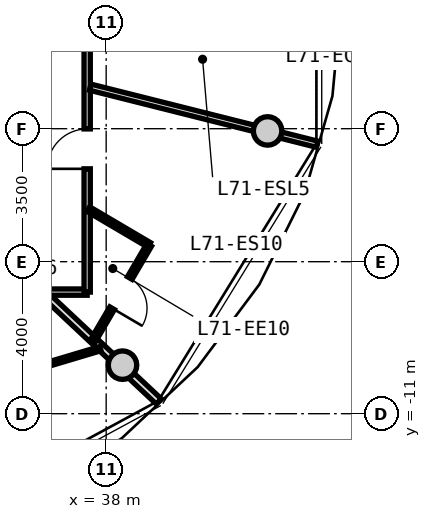
"""IFC4 building model, lengths in metres.
Left out: names, types, materials, properties, quantities, classifications, styles, units other than length and angle.
Written with IfcOpenShell. Run it as: python <this file> out.ifc"""

import sys

from ifc_helpers import new_model, si_unit, direction, frame, frame_2d, origin, origin_2d, place, context, subcontext, project, spatial, rectangle, circle, extrude, source, transform, mapped, element, fill, save


model = new_model("IFC4")
c1 = context("Model", 3, precision=1e-05, world=origin(), true_north=direction((0.0, 1.0)))
c2 = subcontext(c1, "Body", "Model", "MODEL_VIEW")
j1 = project(units=[si_unit("LENGTHUNIT", "METRE"), si_unit("PLANEANGLEUNIT", "RADIAN")], contexts=[c1])
p1 = place(None, origin())
s1 = spatial("IfcSite", under=j1, at=p1, CompositionType="ELEMENT")
p2 = place(p1, origin())
s2 = spatial("IfcBuilding", under=s1, at=p2, CompositionType="ELEMENT")
p3 = place(p2, frame((0.0, 0.0, 229.15)))
s3 = spatial("IfcBuildingStorey", under=s2, at=p3, CompositionType="ELEMENT", Elevation=229.15)
m1 = source(origin(), c2, "Body", "SweptSolid", [
    extrude(circle(Radius=0.375, at=origin_2d()), origin(), (0.0, 0.0, 1.0), 3.05),
])
for number, where, z_axis, x_axis in (
    (1, (38.43, -9.723, 0.0), (0.0, 0.0, 1.0), (1.0, 0.0, 0.0)),
    (2, (42.247, -3.559, 0.0), (0.0, 0.0, 1.0), (1.0, 0.0, 0.0)),
):
    element("IfcColumn", number, at=place(p3, frame(where, z_axis=z_axis, x_axis=x_axis)), inside=s3, PredefinedType="COLUMN", context=c2, shape_type="MappedRepresentation", body=[
        mapped(m1, transform((0.0, 0.0, 0.0), x_axis=(1.0, 0.0, 0.0), y_axis=(0.0, 1.0, 0.0), z_axis=(0.0, 0.0, 1.0), scale=1.0)),
    ])
m2 = source(origin(), c2, "Body", "SweptSolid", [
    extrude(rectangle(XDim=19.0, YDim=0.165, at=frame_2d((9.5, 0.0))), origin(), (0.0, 0.0, 1.0), 2.795),
])
p4 = place(p3, frame((37.5, -7.8, 0.0), z_axis=(0.0, 0.0, 1.0), x_axis=(-1.0, 0.0, 0.0)))
e3 = element("IfcWall", 3, at=p4, inside=s3, PredefinedType="PARTITIONING", context=c2, shape_type="MappedRepresentation", body=[
    mapped(m2, transform((0.0, 0.0, 0.0), x_axis=(1.0, 0.0, 0.0), y_axis=(0.0, 1.0, 0.0), z_axis=(0.0, 0.0, 1.0), scale=1.0)),
])
p5 = place(p4, frame((9.392, 0.0, 0.0)))
e4 = element("IfcOpeningElement", 4, at=p5, cuts=e3, PredefinedType="OPENING", context=c2, shape_type="SweptSolid", body=[
    extrude(rectangle(XDim=1.05, YDim=2.15, at=frame_2d((0.525, 1.075))), frame((0.0, 0.093, 0.0), z_axis=(0.0, -1.0, 0.0), x_axis=(1.0, 0.0, 0.0)), (0.0, 0.0, 1.0), 0.185),
])
m3 = source(origin(), c2, "Body", "SweptSolid", [
    extrude(rectangle(XDim=6.88, YDim=0.165, at=frame_2d((3.44, 0.0))), origin(), (0.0, 0.0, 1.0), 2.795),
])
p6 = place(p3, frame((37.5, -0.92, 0.0), z_axis=(0.0, 0.0, 1.0), x_axis=(0.0, -1.0, 0.0)))
e5 = element("IfcWall", 5, at=p6, inside=s3, PredefinedType="PARTITIONING", context=c2, shape_type="MappedRepresentation", body=[
    mapped(m3, transform((0.0, 0.0, 0.0), x_axis=(1.0, 0.0, 0.0), y_axis=(0.0, 1.0, 0.0), z_axis=(0.0, 0.0, 1.0), scale=1.0)),
])
p7 = place(p6, frame((2.586, 0.0, 0.0)))
e6 = element("IfcOpeningElement", 6, at=p7, cuts=e5, PredefinedType="OPENING", context=c2, shape_type="SweptSolid", body=[
    extrude(rectangle(XDim=1.05, YDim=2.15, at=frame_2d((0.525, 1.075))), frame((0.0, 0.093, 0.0), z_axis=(0.0, -1.0, 0.0), x_axis=(1.0, 0.0, 0.0)), (0.0, 0.0, 1.0), 0.185),
])
m4 = source(origin(), c2, "Body", "SweptSolid", [
    extrude(rectangle(XDim=6.157, YDim=0.165, at=frame_2d((3.079, 0.0))), origin(), (0.0, 0.0, 1.0), 2.395),
])
p8 = place(p3, frame((37.58, -2.407, 0.0), z_axis=(0.0, 0.0, 1.0), x_axis=(0.969840867184, -0.243738984038, 0.0)))
e7 = element("IfcWall", 7, at=p8, inside=s3, PredefinedType="PARTITIONING", context=c2, shape_type="MappedRepresentation", body=[
    mapped(m4, transform((0.0, 0.0, 0.0), x_axis=(1.0, 0.0, 0.0), y_axis=(0.0, 1.0, 0.0), z_axis=(0.0, 0.0, 1.0), scale=1.0)),
])
m5 = source(origin(), c2, "Body", "SweptSolid", [
    extrude(rectangle(XDim=4.089, YDim=0.19, at=frame_2d((2.044, 0.0))), origin(), (0.0, 0.0, 1.0), 2.395),
])
p9 = place(p3, frame((36.402, -7.88, 0.0), z_axis=(0.0, 0.0, 1.0), x_axis=(0.729401273609, -0.684086092577, 0.0)))
e8 = element("IfcWall", 8, at=p9, inside=s3, PredefinedType="PARTITIONING", context=c2, shape_type="MappedRepresentation", body=[
    mapped(m5, transform((0.0, 0.0, 0.0), x_axis=(1.0, 0.0, 0.0), y_axis=(0.0, 1.0, 0.0), z_axis=(0.0, 0.0, 1.0), scale=1.0)),
])
m6 = source(origin(), c2, "Body", "SweptSolid", [
    extrude(rectangle(XDim=6.936, YDim=0.115, at=frame_2d((3.468, 0.0))), origin(), (0.0, 0.0, 1.0), 2.795),
])
p10 = place(p3, frame((31.203, -11.272, 0.0), z_axis=(0.0, 0.0, 1.0), x_axis=(0.958186895835, 0.286143098205, 0.0)))
e9 = element("IfcWall", 9, at=p10, inside=s3, PredefinedType="PARTITIONING", context=c2, shape_type="MappedRepresentation", body=[
    mapped(m6, transform((0.0, 0.0, 0.0), x_axis=(1.0, 0.0, 0.0), y_axis=(0.0, 1.0, 0.0), z_axis=(0.0, 0.0, 1.0), scale=1.0)),
])
p11 = place(p10, frame((2.993, 0.0, 0.0)))
e10 = element("IfcOpeningElement", 10, at=p11, cuts=e9, PredefinedType="OPENING", context=c2, shape_type="SweptSolid", body=[
    extrude(rectangle(XDim=0.95, YDim=2.1, at=frame_2d((0.475, 1.05))), frame((0.0, 0.067, 0.0), z_axis=(0.0, -1.0, 0.0), x_axis=(1.0, 0.0, 0.0)), (0.0, 0.0, 1.0), 0.135),
])
m7 = source(origin(), c2, "Body", "SweptSolid", [
    extrude(rectangle(XDim=1.859, YDim=0.14, at=frame_2d((0.93, 0.0))), origin(), (0.0, 0.0, 1.0), 2.795),
])
p12 = place(p3, frame((37.53, -5.615, 0.0), z_axis=(0.0, 0.0, 1.0), x_axis=(0.861555897139, -0.507662718845, 0.0)))
e11 = element("IfcWall", 11, at=p12, inside=s3, PredefinedType="PARTITIONING", context=c2, shape_type="MappedRepresentation", body=[
    mapped(m7, transform((0.0, 0.0, 0.0), x_axis=(1.0, 0.0, 0.0), y_axis=(0.0, 1.0, 0.0), z_axis=(0.0, 0.0, 1.0), scale=1.0)),
])
m8 = source(origin(), c2, "Body", "SweptSolid", [
    extrude(rectangle(XDim=2.939, YDim=0.14, at=frame_2d((1.47, 0.0))), origin(), (0.0, 0.0, 1.0), 2.795),
])
p13 = place(p3, frame((39.132, -6.559, 0.0), z_axis=(0.0, 0.0, 1.0), x_axis=(-0.505883614636, -0.862601743821, 0.0)))
e12 = element("IfcWall", 12, at=p13, inside=s3, PredefinedType="PARTITIONING", context=c2, shape_type="MappedRepresentation", body=[
    mapped(m8, transform((0.0, 0.0, 0.0), x_axis=(1.0, 0.0, 0.0), y_axis=(0.0, 1.0, 0.0), z_axis=(0.0, 0.0, 1.0), scale=1.0)),
])
p14 = place(p13, frame((1.01, 0.0, 0.0)))
e13 = element("IfcOpeningElement", 13, at=p14, cuts=e12, PredefinedType="OPENING", context=c2, shape_type="SweptSolid", body=[
    extrude(rectangle(XDim=0.92, YDim=2.1, at=frame_2d((0.46, 1.05))), frame((0.0, 0.08, 0.0), z_axis=(0.0, -1.0, 0.0), x_axis=(1.0, 0.0, 0.0)), (0.0, 0.0, 1.0), 0.16),
])
m9 = source(origin(), c2, "Body", "SweptSolid", [
    extrude(rectangle(XDim=1.05, YDim=2.15, at=frame_2d((0.525, 1.075))), frame((0.0, 0.025, 0.0), z_axis=(0.0, -1.0, 0.0), x_axis=(1.0, 0.0, 0.0)), (0.0, 0.0, 1.0), 0.05),
])
p15 = place(p7, frame((1.05, 0.0, 0.0), z_axis=(0.0, 0.0, 1.0), x_axis=(-1.0, 0.0, 0.0)))
e14 = element("IfcDoor", 14, at=p15, inside=s3, OperationType="SINGLE_SWING_LEFT", PredefinedType="DOOR", context=c2, shape_type="MappedRepresentation", body=[
    mapped(m9, transform((0.0, 0.0, 0.0), x_axis=(1.0, 0.0, 0.0), y_axis=(0.0, 1.0, 0.0), z_axis=(0.0, 0.0, 1.0), scale=1.0)),
])
fill(e6, e14)
m10 = source(origin(), c2, "Body", "SweptSolid", [
    extrude(rectangle(XDim=0.92, YDim=2.1, at=frame_2d((0.46, 1.05))), frame((0.0, 0.025, 0.0), z_axis=(0.0, -1.0, 0.0), x_axis=(1.0, 0.0, 0.0)), (0.0, 0.0, 1.0), 0.05),
])
p16 = place(p14, origin())
e15 = element("IfcDoor", 15, at=p16, inside=s3, OperationType="SINGLE_SWING_RIGHT", PredefinedType="DOOR", context=c2, shape_type="MappedRepresentation", body=[
    mapped(m10, transform((0.0, 0.0, 0.0), x_axis=(1.0, 0.0, 0.0), y_axis=(0.0, 1.0, 0.0), z_axis=(0.0, 0.0, 1.0), scale=1.0)),
])
fill(e13, e15)
save(model, sys.argv[1])
